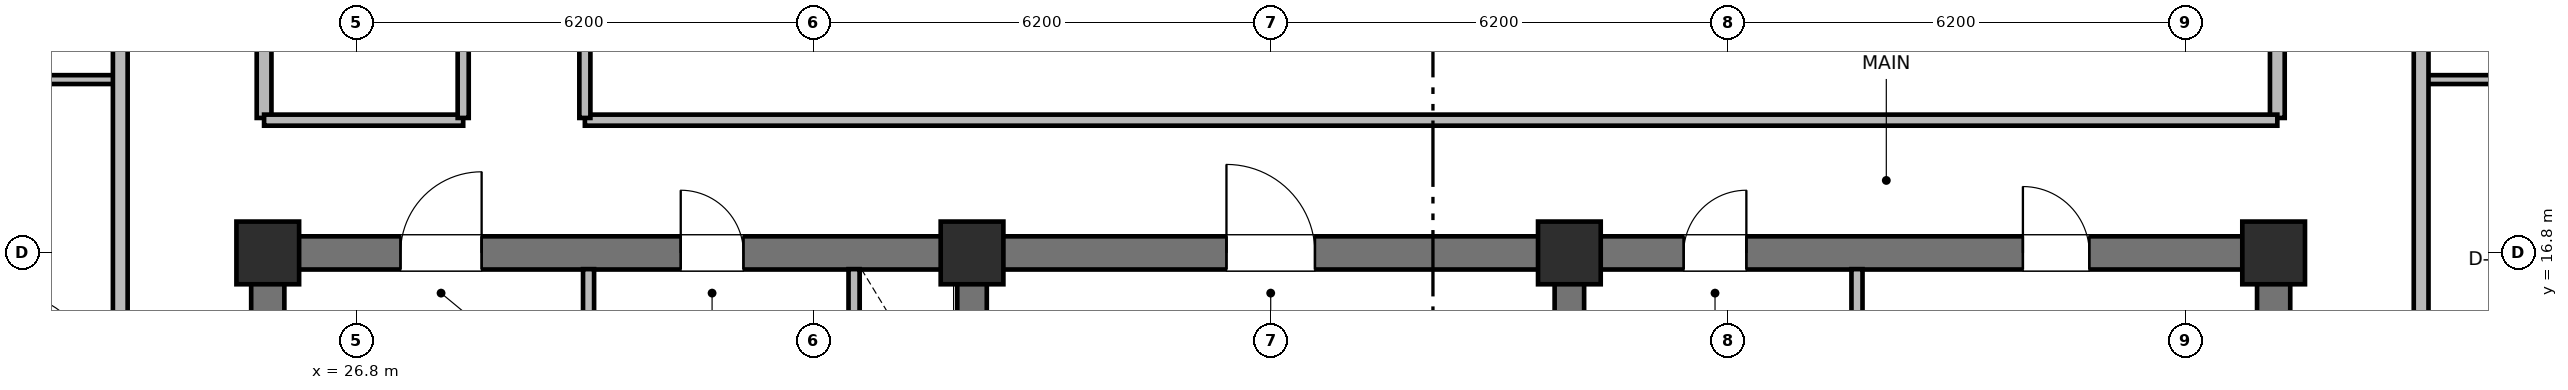
"""IFC4 building model, lengths in metres.
Left out: names, types, materials, properties, quantities, classifications, styles, units other than length and angle.
Written with IfcOpenShell. Run it as: python <this file> out.ifc"""

import sys

from ifc_helpers import new_model, si_unit, direction, frame, frame_2d, origin, origin_2d, place, context, subcontext, project, spatial, rectangle, extrude, element, fill, save


model = new_model("IFC4")
c1 = context("Model", 3, precision=1e-05, world=origin(), true_north=direction((0.0, 1.0)))
c2 = subcontext(c1, "Body", "Model", "MODEL_VIEW")
j1 = project(units=[si_unit("LENGTHUNIT", "METRE"), si_unit("PLANEANGLEUNIT", "RADIAN")], contexts=[c1])
p1 = place(None, origin())
s1 = spatial("IfcSite", under=j1, at=p1, CompositionType="ELEMENT")
p2 = place(p1, origin())
s2 = spatial("IfcBuilding", under=s1, at=p2, CompositionType="ELEMENT")
p3 = place(p2, frame((0.0, 0.0, 225.8)))
s3 = spatial("IfcBuildingStorey", under=s2, at=p3, CompositionType="ELEMENT", Elevation=225.8)
for number, where, z_axis, x_axis in (
    (1, (25.6, 10.825, 0.0), (0.0, 0.0, 1.0), (0.0, 1.0, 0.0)),
    (2, (52.8, 10.825, 0.0), (0.0, 0.0, 1.0), (0.0, 1.0, 0.0)),
):
    element("IfcWall", number, at=place(p3, frame(where, z_axis=z_axis, x_axis=x_axis)), inside=s3, PredefinedType="SHEAR", context=c2, shape_type="SweptSolid", body=[
        extrude(rectangle(XDim=5.75, YDim=0.45, at=frame_2d((2.875, 0.0))), origin(), (0.0, 0.0, 1.0), 3.7),
    ])
p4 = place(p3, frame((25.6, 16.8, 0.0), z_axis=(0.0, 0.0, 1.0), x_axis=(1.0, 0.0, 0.0)))
e3 = element("IfcWall", 3, at=p4, inside=s3, PredefinedType="SHEAR", context=c2, shape_type="SweptSolid", body=[
    extrude(rectangle(XDim=27.2, YDim=0.45, at=frame_2d((13.6, 0.0))), origin(), (0.0, 0.0, 1.0), 3.7),
])
p5 = place(p4, frame((1.8, 0.0, 0.0)))
e4 = element("IfcOpeningElement", 4, at=p5, cuts=e3, PredefinedType="OPENING", context=c2, shape_type="SweptSolid", body=[
    extrude(rectangle(XDim=1.1, YDim=2.15, at=frame_2d((0.55, 1.075))), frame((0.0, 0.235, 0.0), z_axis=(0.0, -1.0, 0.0), x_axis=(1.0, 0.0, 0.0)), (0.0, 0.0, 1.0), 0.47),
])
p6 = place(p4, frame((5.6, 0.0, 0.0)))
e5 = element("IfcOpeningElement", 5, at=p6, cuts=e3, PredefinedType="OPENING", context=c2, shape_type="SweptSolid", body=[
    extrude(rectangle(XDim=0.85, YDim=2.1, at=frame_2d((0.425, 1.05))), frame((0.0, 0.235, 0.0), z_axis=(0.0, -1.0, 0.0), x_axis=(1.0, 0.0, 0.0)), (0.0, 0.0, 1.0), 0.47),
])
p7 = place(p4, frame((13.0, 0.0, 0.0)))
e6 = element("IfcOpeningElement", 6, at=p7, cuts=e3, PredefinedType="OPENING", context=c2, shape_type="SweptSolid", body=[
    extrude(rectangle(XDim=1.2, YDim=2.15, at=frame_2d((0.6, 1.075))), frame((0.0, 0.235, 0.0), z_axis=(0.0, -1.0, 0.0), x_axis=(1.0, 0.0, 0.0)), (0.0, 0.0, 1.0), 0.47),
])
p8 = place(p4, frame((19.2, 0.0, 0.0)))
e7 = element("IfcOpeningElement", 7, at=p8, cuts=e3, PredefinedType="OPENING", context=c2, shape_type="SweptSolid", body=[
    extrude(rectangle(XDim=0.85, YDim=2.1, at=frame_2d((0.425, 1.05))), frame((0.0, 0.235, 0.0), z_axis=(0.0, -1.0, 0.0), x_axis=(1.0, 0.0, 0.0)), (0.0, 0.0, 1.0), 0.47),
])
p9 = place(p4, frame((23.8, 0.0, 0.0)))
e8 = element("IfcOpeningElement", 8, at=p9, cuts=e3, PredefinedType="OPENING", context=c2, shape_type="SweptSolid", body=[
    extrude(rectangle(XDim=0.9, YDim=2.1, at=frame_2d((0.45, 1.05))), frame((0.0, 0.235, 0.0), z_axis=(0.0, -1.0, 0.0), x_axis=(1.0, 0.0, 0.0)), (0.0, 0.0, 1.0), 0.47),
])
for number, where, z_axis, x_axis in (
    (9, (35.15, 10.825, 0.0), (0.0, 0.0, 1.0), (0.0, 1.0, 0.0)),
    (10, (43.25, 10.825, 0.0), (0.0, 0.0, 1.0), (0.0, 1.0, 0.0)),
):
    element("IfcWall", number, at=place(p3, frame(where, z_axis=z_axis, x_axis=x_axis)), inside=s3, PredefinedType="SHEAR", context=c2, shape_type="SweptSolid", body=[
        extrude(rectangle(XDim=5.75, YDim=0.4, at=frame_2d((2.875, 0.0))), origin(), (0.0, 0.0, 1.0), 3.7),
    ])
for number, where, z_axis, x_axis in (
    (11, (25.6, 16.8, 0.0), (0.0, 0.0, 1.0), (1.0, 0.0, 0.0)),
    (12, (35.15, 16.8, 0.0), (0.0, 0.0, 1.0), (1.0, 0.0, 0.0)),
    (13, (43.25, 16.8, 0.0), (0.0, 0.0, 1.0), (1.0, 0.0, 0.0)),
    (14, (52.8, 16.8, 0.0), (0.0, 0.0, 1.0), (1.0, 0.0, 0.0)),
):
    element("IfcColumn", number, at=place(p3, frame(where, z_axis=z_axis, x_axis=x_axis)), inside=s3, PredefinedType="COLUMN", context=c2, shape_type="SweptSolid", body=[
        extrude(rectangle(XDim=0.85, YDim=0.85, at=origin_2d()), origin(), (0.0, 0.0, 1.0), 3.7),
    ])
p10 = place(p3, frame((29.95, 14.5, 0.0), z_axis=(0.0, 0.0, 1.0), x_axis=(0.0, 1.0, 0.0)))
e15 = element("IfcWall", 15, at=p10, inside=s3, PredefinedType="PARTITIONING", context=c2, shape_type="SweptSolid", body=[
    extrude(rectangle(XDim=2.08, YDim=0.15, at=frame_2d((1.04, 0.0))), origin(), (0.0, 0.0, 1.0), 2.56),
])
p11 = place(p3, frame((33.55, 14.5, 0.0), z_axis=(0.0, 0.0, 1.0), x_axis=(0.0, 1.0, 0.0)))
e16 = element("IfcWall", 16, at=p11, inside=s3, PredefinedType="PARTITIONING", context=c2, shape_type="SweptSolid", body=[
    extrude(rectangle(XDim=2.08, YDim=0.15, at=frame_2d((1.04, 0.0))), origin(), (0.0, 0.0, 1.0), 2.56),
])
p12 = place(p11, frame((0.55, 0.0, 0.0)))
e17 = element("IfcOpeningElement", 17, at=p12, cuts=e16, PredefinedType="OPENING", context=c2, shape_type="SweptSolid", body=[
    extrude(rectangle(XDim=0.85, YDim=2.05, at=frame_2d((0.425, 1.025))), frame((0.0, 0.085, 0.0), z_axis=(0.0, -1.0, 0.0), x_axis=(1.0, 0.0, 0.0)), (0.0, 0.0, 1.0), 0.17),
])
p13 = place(p3, frame((47.15, 10.95, 0.0), z_axis=(0.0, 0.0, 1.0), x_axis=(0.0, 1.0, 0.0)))
e18 = element("IfcWall", 18, at=p13, inside=s3, PredefinedType="PARTITIONING", context=c2, shape_type="SweptSolid", body=[
    extrude(rectangle(XDim=5.63, YDim=0.15, at=frame_2d((2.815, 0.0))), origin(), (0.0, 0.0, 1.0), 2.56),
])
for number, where, z_axis, x_axis in (
    (19, (25.55, 18.63, 0.0), (0.0, 0.0, 1.0), (0.0, 1.0, 0.0)),
    (20, (52.85, 18.63, 0.0), (0.0, 0.0, 1.0), (0.0, 1.0, 0.0)),
):
    element("IfcWall", number, at=place(p3, frame(where, z_axis=z_axis, x_axis=x_axis)), inside=s3, PredefinedType="PARTITIONING", context=c2, shape_type="SweptSolid", body=[
        extrude(rectangle(XDim=19.14, YDim=0.2, at=frame_2d((9.57, 0.0))), origin(), (0.0, 0.0, 1.0), 2.56),
    ])
p14 = place(p3, frame((25.55, 18.6, 0.0), z_axis=(0.0, 0.0, 1.0), x_axis=(1.0, 0.0, 0.0)))
e21 = element("IfcWall", 21, at=p14, inside=s3, PredefinedType="PARTITIONING", context=c2, shape_type="SweptSolid", body=[
    extrude(rectangle(XDim=2.7, YDim=0.15, at=frame_2d((1.35, 0.0))), origin(), (0.0, 0.0, 1.0), 2.56),
])
p15 = place(p3, frame((29.9, 18.6, 0.0), z_axis=(0.0, 0.0, 1.0), x_axis=(1.0, 0.0, 0.0)))
e22 = element("IfcWall", 22, at=p15, inside=s3, PredefinedType="PARTITIONING", context=c2, shape_type="SweptSolid", body=[
    extrude(rectangle(XDim=22.95, YDim=0.15, at=frame_2d((11.475, 0.0))), origin(), (0.0, 0.0, 1.0), 2.56),
])
p16 = place(p3, frame((28.25, 18.63, 0.0), z_axis=(0.0, 0.0, 1.0), x_axis=(0.0, 1.0, 0.0)))
e23 = element("IfcWall", 23, at=p16, inside=s3, PredefinedType="PARTITIONING", context=c2, shape_type="SweptSolid", body=[
    extrude(rectangle(XDim=19.14, YDim=0.15, at=frame_2d((9.57, 0.0))), origin(), (0.0, 0.0, 1.0), 2.56),
])
p17 = place(p16, frame((3.0, 0.0, 0.0)))
e24 = element("IfcOpeningElement", 24, at=p17, cuts=e23, PredefinedType="OPENING", context=c2, shape_type="SweptSolid", body=[
    extrude(rectangle(XDim=0.9, YDim=2.1, at=frame_2d((0.45, 1.05))), frame((0.0, 0.085, 0.0), z_axis=(0.0, -1.0, 0.0), x_axis=(1.0, 0.0, 0.0)), (0.0, 0.0, 1.0), 0.17),
])
p18 = place(p16, frame((11.5, 0.0, 0.0)))
e25 = element("IfcOpeningElement", 25, at=p18, cuts=e23, PredefinedType="OPENING", context=c2, shape_type="SweptSolid", body=[
    extrude(rectangle(XDim=0.9, YDim=2.1, at=frame_2d((0.45, 1.05))), frame((0.0, 0.085, 0.0), z_axis=(0.0, -1.0, 0.0), x_axis=(1.0, 0.0, 0.0)), (0.0, 0.0, 1.0), 0.17),
])
p19 = place(p3, frame((29.9, 18.63, 0.0), z_axis=(0.0, 0.0, 1.0), x_axis=(0.0, 1.0, 0.0)))
e26 = element("IfcWall", 26, at=p19, inside=s3, PredefinedType="PARTITIONING", context=c2, shape_type="SweptSolid", body=[
    extrude(rectangle(XDim=19.14, YDim=0.15, at=frame_2d((9.57, 0.0))), origin(), (0.0, 0.0, 1.0), 2.56),
])
p20 = place(p19, frame((2.4, 0.0, 0.0)))
e27 = element("IfcOpeningElement", 27, at=p20, cuts=e26, PredefinedType="OPENING", context=c2, shape_type="SweptSolid", body=[
    extrude(rectangle(XDim=1.0, YDim=2.15, at=frame_2d((0.5, 1.075))), frame((0.0, 0.085, 0.0), z_axis=(0.0, -1.0, 0.0), x_axis=(1.0, 0.0, 0.0)), (0.0, 0.0, 1.0), 0.17),
])
p21 = place(p19, frame((8.89, 0.0, 0.0)))
e28 = element("IfcOpeningElement", 28, at=p21, cuts=e26, PredefinedType="OPENING", context=c2, shape_type="SweptSolid", body=[
    extrude(rectangle(XDim=1.0, YDim=2.15, at=frame_2d((0.5, 1.075))), frame((0.0, 0.085, 0.0), z_axis=(0.0, -1.0, 0.0), x_axis=(1.0, 0.0, 0.0)), (0.0, 0.0, 1.0), 0.17),
])
p22 = place(p3, frame((21.65, 19.15, 0.0), z_axis=(0.0, 0.0, 1.0), x_axis=(1.0, 0.0, 0.0)))
e29 = element("IfcWall", 29, at=p22, inside=s3, PredefinedType="PARTITIONING", context=c2, shape_type="SweptSolid", body=[
    extrude(rectangle(XDim=1.95, YDim=0.12, at=frame_2d((0.975, 0.0))), origin(), (0.0, 0.0, 1.0), 2.56),
])
p23 = place(p3, frame((23.6, 9.95, 0.0), z_axis=(0.0, 0.0, 1.0), x_axis=(0.0, 1.0, 0.0)))
e30 = element("IfcWall", 30, at=p23, inside=s3, PredefinedType="PARTITIONING", context=c2, shape_type="SweptSolid", body=[
    extrude(rectangle(XDim=36.5, YDim=0.2, at=frame_2d((18.25, 0.0))), origin(), (0.0, 0.0, 1.0), 2.56),
])
p24 = place(p23, frame((3.25, 0.0, 0.0)))
e31 = element("IfcOpeningElement", 31, at=p24, cuts=e30, PredefinedType="OPENING", context=c2, shape_type="SweptSolid", body=[
    extrude(rectangle(XDim=1.0, YDim=2.15, at=frame_2d((0.5, 1.075))), frame((0.0, 0.11, 0.0), z_axis=(0.0, -1.0, 0.0), x_axis=(1.0, 0.0, 0.0)), (0.0, 0.0, 1.0), 0.22),
])
p25 = place(p3, frame((54.8, 19.15, 0.0), z_axis=(0.0, 0.0, 1.0), x_axis=(1.0, 0.0, 0.0)))
e32 = element("IfcWall", 32, at=p25, inside=s3, PredefinedType="PARTITIONING", context=c2, shape_type="SweptSolid", body=[
    extrude(rectangle(XDim=1.95, YDim=0.12, at=frame_2d((0.975, 0.0))), origin(), (0.0, 0.0, 1.0), 2.56),
])
p26 = place(p3, frame((54.8, 9.95, 0.0), z_axis=(0.0, 0.0, 1.0), x_axis=(0.0, 1.0, 0.0)))
e33 = element("IfcWall", 33, at=p26, inside=s3, PredefinedType="PARTITIONING", context=c2, shape_type="SweptSolid", body=[
    extrude(rectangle(XDim=36.5, YDim=0.2, at=frame_2d((18.25, 0.0))), origin(), (0.0, 0.0, 1.0), 2.56),
])
p27 = place(p26, frame((3.25, 0.0, 0.0)))
e34 = element("IfcOpeningElement", 34, at=p27, cuts=e33, PredefinedType="OPENING", context=c2, shape_type="SweptSolid", body=[
    extrude(rectangle(XDim=1.0, YDim=2.15, at=frame_2d((0.5, 1.075))), frame((0.0, 0.11, 0.0), z_axis=(0.0, -1.0, 0.0), x_axis=(1.0, 0.0, 0.0)), (0.0, 0.0, 1.0), 0.22),
])
p28 = place(p26, frame((14.25, 0.0, 0.0)))
e35 = element("IfcOpeningElement", 35, at=p28, cuts=e33, PredefinedType="OPENING", context=c2, shape_type="SweptSolid", body=[
    extrude(rectangle(XDim=1.0, YDim=2.15, at=frame_2d((0.5, 1.075))), frame((0.0, 0.11, 0.0), z_axis=(0.0, -1.0, 0.0), x_axis=(1.0, 0.0, 0.0)), (0.0, 0.0, 1.0), 0.22),
])
p29 = place(p5, origin())
e36 = element("IfcDoor", 36, at=p29, inside=s3, OperationType="SINGLE_SWING_RIGHT", PredefinedType="DOOR", context=c2, shape_type="SweptSolid", body=[
    extrude(rectangle(XDim=1.1, YDim=2.15, at=frame_2d((0.55, 1.075))), frame((0.0, 0.025, 0.0), z_axis=(0.0, -1.0, 0.0), x_axis=(1.0, 0.0, 0.0)), (0.0, 0.0, 1.0), 0.05),
])
fill(e4, e36)
p30 = place(p6, origin())
e37 = element("IfcDoor", 37, at=p30, inside=s3, OperationType="SINGLE_SWING_LEFT", PredefinedType="DOOR", context=c2, shape_type="SweptSolid", body=[
    extrude(rectangle(XDim=0.85, YDim=2.1, at=frame_2d((0.425, 1.05))), frame((0.0, 0.025, 0.0), z_axis=(0.0, -1.0, 0.0), x_axis=(1.0, 0.0, 0.0)), (0.0, 0.0, 1.0), 0.05),
])
fill(e5, e37)
p31 = place(p7, origin())
e38 = element("IfcDoor", 38, at=p31, inside=s3, OperationType="SINGLE_SWING_LEFT", PredefinedType="DOOR", context=c2, shape_type="SweptSolid", body=[
    extrude(rectangle(XDim=1.2, YDim=2.15, at=frame_2d((0.6, 1.075))), frame((0.0, 0.025, 0.0), z_axis=(0.0, -1.0, 0.0), x_axis=(1.0, 0.0, 0.0)), (0.0, 0.0, 1.0), 0.05),
])
fill(e6, e38)
p32 = place(p8, origin())
e39 = element("IfcDoor", 39, at=p32, inside=s3, OperationType="SINGLE_SWING_RIGHT", PredefinedType="DOOR", context=c2, shape_type="SweptSolid", body=[
    extrude(rectangle(XDim=0.85, YDim=2.1, at=frame_2d((0.425, 1.05))), frame((0.0, 0.025, 0.0), z_axis=(0.0, -1.0, 0.0), x_axis=(1.0, 0.0, 0.0)), (0.0, 0.0, 1.0), 0.05),
])
fill(e7, e39)
p33 = place(p9, origin())
e40 = element("IfcDoor", 40, at=p33, inside=s3, OperationType="SINGLE_SWING_LEFT", PredefinedType="DOOR", context=c2, shape_type="SweptSolid", body=[
    extrude(rectangle(XDim=0.9, YDim=2.1, at=frame_2d((0.45, 1.05))), frame((0.0, 0.025, 0.0), z_axis=(0.0, -1.0, 0.0), x_axis=(1.0, 0.0, 0.0)), (0.0, 0.0, 1.0), 0.05),
])
fill(e8, e40)
save(model, sys.argv[1])
